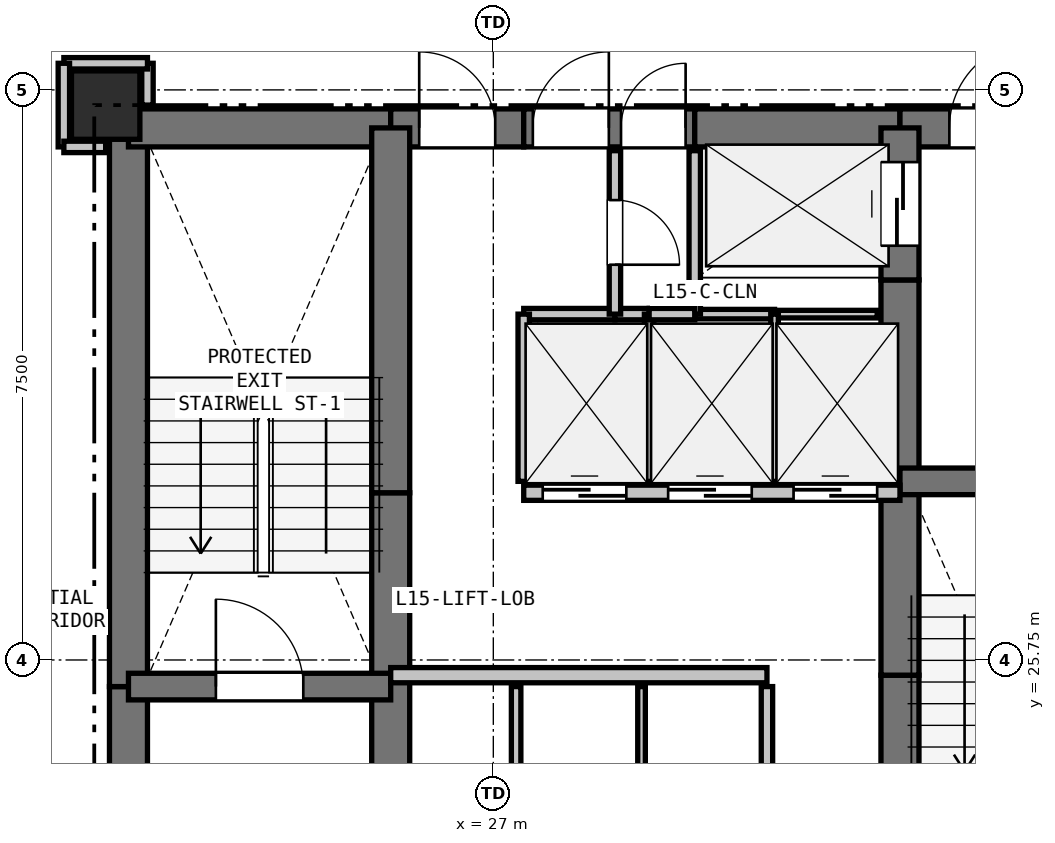
"""IFC4 building model, lengths in metres.
Left out: names, types, materials, properties, quantities, classifications, styles, units other than length and angle.
Written with IfcOpenShell. Run it as: python <this file> out.ifc"""

import sys

from ifc_helpers import new_model, si_unit, direction, frame, frame_2d, origin, origin_2d, place, context, subcontext, project, spatial, rectangle, extrude, element, fill, save


model = new_model("IFC4")
c1 = context("Model", 3, precision=1e-05, world=origin(), true_north=direction((0.0, 1.0)))
c2 = subcontext(c1, "Body", "Model", "MODEL_VIEW")
j1 = project(units=[si_unit("LENGTHUNIT", "METRE"), si_unit("PLANEANGLEUNIT", "RADIAN")], contexts=[c1])
p1 = place(None, origin())
s1 = spatial("IfcSite", under=j1, at=p1, CompositionType="ELEMENT")
p2 = place(p1, origin())
s2 = spatial("IfcBuilding", under=s1, at=p2, CompositionType="ELEMENT")
p3 = place(p2, frame((0.0, 0.0, 55.5)))
s3 = spatial("IfcBuildingStorey", under=s2, at=p3, CompositionType="ELEMENT", Elevation=55.5)
p4 = place(p3, frame((21.9, 33.05, 0.0), z_axis=(0.0, 0.0, 1.0), x_axis=(1.0, 0.0, 0.0)))
e1 = element("IfcColumn", 1, at=p4, inside=s3, PredefinedType="COLUMN", context=c2, shape_type="SweptSolid", body=[
    extrude(rectangle(XDim=0.9, YDim=0.9, at=origin_2d()), origin(), (0.0, 0.0, 1.0), 3.3),
])
p5 = place(p3, frame((22.2, 20.75, 0.0), z_axis=(0.0, 0.0, 1.0), x_axis=(0.0, 1.0, 0.0)))
e2 = element("IfcWall", 2, at=p5, inside=s3, PredefinedType="SHEAR", context=c2, shape_type="SweptSolid", body=[
    extrude(rectangle(XDim=4.65, YDim=0.5, at=frame_2d((2.325, 0.0))), origin(), (0.0, 0.0, 1.0), 3.04),
])
p6 = place(p3, frame((22.2, 25.4, 0.0), z_axis=(0.0, 0.0, 1.0), x_axis=(0.0, 1.0, 0.0)))
e3 = element("IfcWall", 3, at=p6, inside=s3, PredefinedType="SHEAR", context=c2, shape_type="SweptSolid", body=[
    extrude(rectangle(XDim=7.35, YDim=0.5, at=frame_2d((3.675, 0.0))), origin(), (0.0, 0.0, 1.0), 3.04),
])
p7 = place(p3, frame((22.2, 32.75, 0.0), z_axis=(0.0, 0.0, 1.0), x_axis=(1.0, 0.0, 0.0)))
e4 = element("IfcWall", 4, at=p7, inside=s3, PredefinedType="SHEAR", context=c2, shape_type="SweptSolid", body=[
    extrude(rectangle(XDim=3.45, YDim=0.5, at=frame_2d((1.725, 0.0))), origin(), (0.0, 0.0, 1.0), 3.04),
])
p8 = place(p3, frame((25.65, 32.75, 0.0), z_axis=(0.0, 0.0, 1.0), x_axis=(1.0, 0.0, 0.0)))
e5 = element("IfcWall", 5, at=p8, inside=s3, PredefinedType="SHEAR", context=c2, shape_type="SweptSolid", body=[
    extrude(rectangle(XDim=1.75, YDim=0.5, at=frame_2d((0.875, 0.0))), origin(), (0.0, 0.0, 1.0), 3.04),
])
p9 = place(p8, frame((0.375, 0.0, 0.0)))
e6 = element("IfcOpeningElement", 6, at=p9, cuts=e5, PredefinedType="OPENING", context=c2, shape_type="SweptSolid", body=[
    extrude(rectangle(XDim=1.0, YDim=2.15, at=frame_2d((0.5, 1.075))), frame((0.0, 0.26, 0.0), z_axis=(0.0, -1.0, 0.0), x_axis=(1.0, 0.0, 0.0)), (0.0, 0.0, 1.0), 0.52),
])
p10 = place(p3, frame((27.4, 32.75, 0.0), z_axis=(0.0, 0.0, 1.0), x_axis=(1.0, 0.0, 0.0)))
e7 = element("IfcWall", 7, at=p10, inside=s3, PredefinedType="SHEAR", context=c2, shape_type="SweptSolid", body=[
    extrude(rectangle(XDim=2.25, YDim=0.5, at=frame_2d((1.125, 0.0))), origin(), (0.0, 0.0, 1.0), 3.04),
])
p11 = place(p10, frame((0.12, 0.0, 0.0)))
e8 = element("IfcOpeningElement", 8, at=p11, cuts=e7, PredefinedType="OPENING", context=c2, shape_type="SweptSolid", body=[
    extrude(rectangle(XDim=1.0, YDim=2.15, at=frame_2d((0.5, 1.075))), frame((0.0, 0.26, 0.0), z_axis=(0.0, -1.0, 0.0), x_axis=(1.0, 0.0, 0.0)), (0.0, 0.0, 1.0), 0.52),
])
p12 = place(p10, frame((1.28, 0.0, 0.0)))
e9 = element("IfcOpeningElement", 9, at=p12, cuts=e7, PredefinedType="OPENING", context=c2, shape_type="SweptSolid", body=[
    extrude(rectangle(XDim=0.85, YDim=2.1, at=frame_2d((0.425, 1.05))), frame((0.0, 0.26, 0.0), z_axis=(0.0, -1.0, 0.0), x_axis=(1.0, 0.0, 0.0)), (0.0, 0.0, 1.0), 0.52),
])
p13 = place(p3, frame((29.65, 32.75, 0.0), z_axis=(0.0, 0.0, 1.0), x_axis=(1.0, 0.0, 0.0)))
e10 = element("IfcWall", 10, at=p13, inside=s3, PredefinedType="SHEAR", context=c2, shape_type="SweptSolid", body=[
    extrude(rectangle(XDim=2.7, YDim=0.5, at=frame_2d((1.35, 0.0))), origin(), (0.0, 0.0, 1.0), 3.04),
])
p14 = place(p3, frame((32.35, 32.75, 0.0), z_axis=(0.0, 0.0, 1.0), x_axis=(1.0, 0.0, 0.0)))
e11 = element("IfcWall", 11, at=p14, inside=s3, PredefinedType="SHEAR", context=c2, shape_type="SweptSolid", body=[
    extrude(rectangle(XDim=3.45, YDim=0.5, at=frame_2d((1.725, 0.0))), origin(), (0.0, 0.0, 1.0), 3.04),
])
p15 = place(p14, frame((0.65, 0.0, 0.0)))
e12 = element("IfcOpeningElement", 12, at=p15, cuts=e11, PredefinedType="OPENING", context=c2, shape_type="SweptSolid", body=[
    extrude(rectangle(XDim=1.15, YDim=2.15, at=frame_2d((0.575, 1.075))), frame((0.0, 0.26, 0.0), z_axis=(0.0, -1.0, 0.0), x_axis=(1.0, 0.0, 0.0)), (0.0, 0.0, 1.0), 0.52),
])
p16 = place(p3, frame((25.65, 22.75, 0.0), z_axis=(0.0, 0.0, 1.0), x_axis=(0.0, 1.0, 0.0)))
e13 = element("IfcWall", 13, at=p16, inside=s3, PredefinedType="SHEAR", context=c2, shape_type="SweptSolid", body=[
    extrude(rectangle(XDim=2.8, YDim=0.5, at=frame_2d((1.4, 0.0))), origin(), (0.0, 0.0, 1.0), 3.04),
])
p17 = place(p3, frame((25.65, 25.55, 0.0), z_axis=(0.0, 0.0, 1.0), x_axis=(0.0, 1.0, 0.0)))
e14 = element("IfcWall", 14, at=p17, inside=s3, PredefinedType="SHEAR", context=c2, shape_type="SweptSolid", body=[
    extrude(rectangle(XDim=2.4, YDim=0.5, at=frame_2d((1.2, 0.0))), origin(), (0.0, 0.0, 1.0), 3.04),
])
for number, where, z_axis, x_axis in (
    (15, (25.65, 27.95, 0.0), (0.0, 0.0, 1.0), (0.0, 1.0, 0.0)),
    (16, (32.35, 20.75, 0.0), (0.0, 0.0, 1.0), (0.0, 1.0, 0.0)),
):
    element("IfcWall", number, at=place(p3, frame(where, z_axis=z_axis, x_axis=x_axis)), inside=s3, PredefinedType="SHEAR", context=c2, shape_type="SweptSolid", body=[
        extrude(rectangle(XDim=4.8, YDim=0.5, at=frame_2d((2.4, 0.0))), origin(), (0.0, 0.0, 1.0), 3.04),
    ])
p18 = place(p3, frame((32.35, 25.55, 0.0), z_axis=(0.0, 0.0, 1.0), x_axis=(0.0, 1.0, 0.0)))
e17 = element("IfcWall", 17, at=p18, inside=s3, PredefinedType="SHEAR", context=c2, shape_type="SweptSolid", body=[
    extrude(rectangle(XDim=2.4, YDim=0.5, at=frame_2d((1.2, 0.0))), origin(), (0.0, 0.0, 1.0), 3.04),
])
p19 = place(p3, frame((32.35, 27.95, 0.0), z_axis=(0.0, 0.0, 1.0), x_axis=(0.0, 1.0, 0.0)))
e18 = element("IfcWall", 18, at=p19, inside=s3, PredefinedType="SHEAR", context=c2, shape_type="SweptSolid", body=[
    extrude(rectangle(XDim=2.8, YDim=0.5, at=frame_2d((1.4, 0.0))), origin(), (0.0, 0.0, 1.0), 3.04),
])
p20 = place(p3, frame((32.35, 30.75, 0.0), z_axis=(0.0, 0.0, 1.0), x_axis=(0.0, 1.0, 0.0)))
e19 = element("IfcWall", 19, at=p20, inside=s3, PredefinedType="SHEAR", context=c2, shape_type="SweptSolid", body=[
    extrude(rectangle(XDim=2.0, YDim=0.5, at=frame_2d((1.0, 0.0))), origin(), (0.0, 0.0, 1.0), 3.04),
])
p21 = place(p20, frame((0.45, 0.0, 0.0)))
e20 = element("IfcOpeningElement", 20, at=p21, cuts=e19, PredefinedType="OPENING", context=c2, shape_type="SweptSolid", body=[
    extrude(rectangle(XDim=1.1, YDim=2.15, at=frame_2d((0.55, 1.075))), frame((0.0, 0.26, 0.0), z_axis=(0.0, -1.0, 0.0), x_axis=(1.0, 0.0, 0.0)), (0.0, 0.0, 1.0), 0.52),
])
p22 = place(p3, frame((22.2, 25.4, 0.0), z_axis=(0.0, 0.0, 1.0), x_axis=(1.0, 0.0, 0.0)))
e21 = element("IfcWall", 21, at=p22, inside=s3, PredefinedType="SHEAR", context=c2, shape_type="SweptSolid", body=[
    extrude(rectangle(XDim=3.45, YDim=0.35, at=frame_2d((1.725, 0.0))), origin(), (0.0, 0.0, 1.0), 3.04),
])
p23 = place(p22, frame((1.15, 0.0, 0.0)))
e22 = element("IfcOpeningElement", 22, at=p23, cuts=e21, PredefinedType="OPENING", context=c2, shape_type="SweptSolid", body=[
    extrude(rectangle(XDim=1.15, YDim=2.15, at=frame_2d((0.575, 1.075))), frame((0.0, 0.185, 0.0), z_axis=(0.0, -1.0, 0.0), x_axis=(1.0, 0.0, 0.0)), (0.0, 0.0, 1.0), 0.37),
])
p24 = place(p3, frame((32.35, 28.1, 0.0), z_axis=(0.0, 0.0, 1.0), x_axis=(1.0, 0.0, 0.0)))
e23 = element("IfcWall", 23, at=p24, inside=s3, PredefinedType="SHEAR", context=c2, shape_type="SweptSolid", body=[
    extrude(rectangle(XDim=3.45, YDim=0.35, at=frame_2d((1.725, 0.0))), origin(), (0.0, 0.0, 1.0), 3.04),
])
p25 = place(p24, frame((1.15, 0.0, 0.0)))
e24 = element("IfcOpeningElement", 24, at=p25, cuts=e23, PredefinedType="OPENING", context=c2, shape_type="SweptSolid", body=[
    extrude(rectangle(XDim=1.15, YDim=2.15, at=frame_2d((0.575, 1.075))), frame((0.0, 0.185, 0.0), z_axis=(0.0, -1.0, 0.0), x_axis=(1.0, 0.0, 0.0)), (0.0, 0.0, 1.0), 0.37),
])
p26 = place(p3, frame((25.65, 25.55, 0.0), z_axis=(0.0, 0.0, 1.0), x_axis=(1.0, 0.0, 0.0)))
e25 = element("IfcWall", 25, at=p26, inside=s3, PredefinedType="PARTITIONING", context=c2, shape_type="SweptSolid", body=[
    extrude(rectangle(XDim=4.95, YDim=0.2, at=frame_2d((2.475, 0.0))), origin(), (0.0, 0.0, 1.0), 3.04),
])
p27 = place(p3, frame((27.4, 27.95, 0.0), z_axis=(0.0, 0.0, 1.0), x_axis=(1.0, 0.0, 0.0)))
e26 = element("IfcWall", 26, at=p27, inside=s3, PredefinedType="PARTITIONING", context=c2, shape_type="SweptSolid", body=[
    extrude(rectangle(XDim=4.95, YDim=0.2, at=frame_2d((2.475, 0.0))), origin(), (0.0, 0.0, 1.0), 3.04),
])
p28 = place(p27, frame((0.25, 0.0, 0.0)))
e27 = element("IfcOpeningElement", 27, at=p28, cuts=e26, PredefinedType="OPENING", context=c2, shape_type="SweptSolid", body=[
    extrude(rectangle(XDim=1.1, YDim=2.15, at=frame_2d((0.55, 1.075))), frame((0.0, 0.11, 0.0), z_axis=(0.0, -1.0, 0.0), x_axis=(1.0, 0.0, 0.0)), (0.0, 0.0, 1.0), 0.22),
])
p29 = place(p27, frame((1.9, 0.0, 0.0)))
e28 = element("IfcOpeningElement", 28, at=p29, cuts=e26, PredefinedType="OPENING", context=c2, shape_type="SweptSolid", body=[
    extrude(rectangle(XDim=1.1, YDim=2.15, at=frame_2d((0.55, 1.075))), frame((0.0, 0.11, 0.0), z_axis=(0.0, -1.0, 0.0), x_axis=(1.0, 0.0, 0.0)), (0.0, 0.0, 1.0), 0.22),
])
p30 = place(p27, frame((3.55, 0.0, 0.0)))
e29 = element("IfcOpeningElement", 29, at=p30, cuts=e26, PredefinedType="OPENING", context=c2, shape_type="SweptSolid", body=[
    extrude(rectangle(XDim=1.1, YDim=2.15, at=frame_2d((0.55, 1.075))), frame((0.0, 0.11, 0.0), z_axis=(0.0, -1.0, 0.0), x_axis=(1.0, 0.0, 0.0)), (0.0, 0.0, 1.0), 0.22),
])
p31 = place(p3, frame((32.05, 30.3, 0.0), z_axis=(0.0, 0.0, 1.0), x_axis=(-1.0, 0.0, 0.0)))
e30 = element("IfcWall", 30, at=p31, inside=s3, PredefinedType="PARTITIONING", context=c2, shape_type="SweptSolid", body=[
    extrude(rectangle(XDim=1.35, YDim=0.1, at=frame_2d((0.675, 0.0))), origin(), (0.0, 0.0, 1.0), 3.04),
])
p32 = place(p3, frame((30.7, 30.3, 0.0), z_axis=(0.0, 0.0, 1.0), x_axis=(-1.0, 0.0, 0.0)))
e31 = element("IfcWall", 31, at=p32, inside=s3, PredefinedType="PARTITIONING", context=c2, shape_type="SweptSolid", body=[
    extrude(rectangle(XDim=1.05, YDim=0.125, at=frame_2d((0.525, 0.0))), origin(), (0.0, 0.0, 1.0), 3.04),
])
p33 = place(p3, frame((29.65, 30.3, 0.0), z_axis=(0.0, 0.0, 1.0), x_axis=(0.0, 1.0, 0.0)))
e32 = element("IfcWall", 32, at=p33, inside=s3, PredefinedType="PARTITIONING", context=c2, shape_type="SweptSolid", body=[
    extrude(rectangle(XDim=2.15, YDim=0.15, at=frame_2d((1.075, 0.0))), origin(), (0.0, 0.0, 1.0), 3.04),
])
p34 = place(p3, frame((27.3, 25.4, 0.0), z_axis=(0.0, 0.0, 1.0), x_axis=(0.0, -1.0, 0.0)))
e33 = element("IfcWall", 33, at=p34, inside=s3, PredefinedType="PARTITIONING", context=c2, shape_type="SweptSolid", body=[
    extrude(rectangle(XDim=2.2, YDim=0.125, at=frame_2d((1.1, 0.0))), origin(), (0.0, 0.0, 1.0), 3.04),
])
p35 = place(p3, frame((28.95, 25.4, 0.0), z_axis=(0.0, 0.0, 1.0), x_axis=(0.0, -1.0, 0.0)))
e34 = element("IfcWall", 34, at=p35, inside=s3, PredefinedType="PARTITIONING", context=c2, shape_type="SweptSolid", body=[
    extrude(rectangle(XDim=2.2, YDim=0.1, at=frame_2d((1.1, 0.0))), origin(), (0.0, 0.0, 1.0), 3.04),
])
p36 = place(p3, frame((30.6, 25.4, 0.0), z_axis=(0.0, 0.0, 1.0), x_axis=(0.0, -1.0, 0.0)))
e35 = element("IfcWall", 35, at=p36, inside=s3, PredefinedType="PARTITIONING", context=c2, shape_type="SweptSolid", body=[
    extrude(rectangle(XDim=2.2, YDim=0.15, at=frame_2d((1.1, 0.0))), origin(), (0.0, 0.0, 1.0), 3.04),
])
p37 = place(p3, frame((27.4, 30.3, 0.0), z_axis=(0.0, 0.0, 1.0), x_axis=(1.0, 0.0, 0.0)))
e36 = element("IfcWall", 36, at=p37, inside=s3, PredefinedType="PARTITIONING", context=c2, shape_type="SweptSolid", body=[
    extrude(rectangle(XDim=1.2, YDim=0.15, at=frame_2d((0.6, 0.0))), origin(), (0.0, 0.0, 1.0), 3.04),
])
p38 = place(p3, frame((28.6, 30.3, 0.0), z_axis=(0.0, 0.0, 1.0), x_axis=(1.0, 0.0, 0.0)))
e37 = element("IfcWall", 37, at=p38, inside=s3, PredefinedType="PARTITIONING", context=c2, shape_type="SweptSolid", body=[
    extrude(rectangle(XDim=0.45, YDim=0.15, at=frame_2d((0.225, 0.0))), origin(), (0.0, 0.0, 1.0), 3.04),
])
p39 = place(p3, frame((29.05, 30.3, 0.0), z_axis=(0.0, 0.0, 1.0), x_axis=(0.0, -1.0, 0.0)))
e38 = element("IfcWall", 38, at=p39, inside=s3, PredefinedType="PARTITIONING", context=c2, shape_type="SweptSolid", body=[
    extrude(rectangle(XDim=2.2, YDim=0.125, at=frame_2d((1.1, 0.0))), origin(), (0.0, 0.0, 1.0), 3.04),
])
p40 = place(p3, frame((27.4, 28.1, 0.0), z_axis=(0.0, 0.0, 1.0), x_axis=(0.0, 1.0, 0.0)))
e39 = element("IfcWall", 39, at=p40, inside=s3, PredefinedType="PARTITIONING", context=c2, shape_type="SweptSolid", body=[
    extrude(rectangle(XDim=2.2, YDim=0.15, at=frame_2d((1.1, 0.0))), origin(), (0.0, 0.0, 1.0), 3.04),
])
p41 = place(p3, frame((29.05, 30.3, 0.0), z_axis=(0.0, 0.0, 1.0), x_axis=(1.0, 0.0, 0.0)))
e40 = element("IfcWall", 40, at=p41, inside=s3, PredefinedType="PARTITIONING", context=c2, shape_type="SweptSolid", body=[
    extrude(rectangle(XDim=0.6, YDim=0.15, at=frame_2d((0.3, 0.0))), origin(), (0.0, 0.0, 1.0), 3.04),
])
p42 = place(p3, frame((30.7, 30.3, 0.0), z_axis=(0.0, 0.0, 1.0), x_axis=(0.0, -1.0, 0.0)))
e41 = element("IfcWall", 41, at=p42, inside=s3, PredefinedType="PARTITIONING", context=c2, shape_type="SweptSolid", body=[
    extrude(rectangle(XDim=2.2, YDim=0.1, at=frame_2d((1.1, 0.0))), origin(), (0.0, 0.0, 1.0), 3.04),
])
p43 = place(p3, frame((28.6, 32.45, 0.0), z_axis=(0.0, 0.0, 1.0), x_axis=(0.0, -1.0, 0.0)))
e42 = element("IfcWall", 42, at=p43, inside=s3, PredefinedType="PARTITIONING", context=c2, shape_type="SweptSolid", body=[
    extrude(rectangle(XDim=2.15, YDim=0.15, at=frame_2d((1.075, 0.0))), origin(), (0.0, 0.0, 1.0), 3.04),
])
p44 = place(p43, frame((0.65, 0.0, 0.0)))
e43 = element("IfcOpeningElement", 43, at=p44, cuts=e42, PredefinedType="OPENING", context=c2, shape_type="SweptSolid", body=[
    extrude(rectangle(XDim=0.85, YDim=2.1, at=frame_2d((0.425, 1.05))), frame((0.0, 0.085, 0.0), z_axis=(0.0, -1.0, 0.0), x_axis=(1.0, 0.0, 0.0)), (0.0, 0.0, 1.0), 0.17),
])
p45 = place(p3, frame((22.45, 33.05, 0.0), z_axis=(0.0, 0.0, 1.0), x_axis=(0.0, 1.0, 0.0)))
e44 = element("IfcWall", 44, at=p45, inside=s3, PredefinedType="PARTITIONING", context=c2, shape_type="SweptSolid", body=[
    extrude(rectangle(XDim=0.55, YDim=0.15, at=frame_2d((0.275, 0.0))), origin(), (0.0, 0.0, 1.0), 2.488),
])
p46 = place(p3, frame((22.45, 33.6, 0.0), z_axis=(0.0, 0.0, 1.0), x_axis=(-1.0, 0.0, 0.0)))
e45 = element("IfcWall", 45, at=p46, inside=s3, PredefinedType="PARTITIONING", context=c2, shape_type="SweptSolid", body=[
    extrude(rectangle(XDim=1.1, YDim=0.15, at=frame_2d((0.55, 0.0))), origin(), (0.0, 0.0, 1.0), 3.04),
])
p47 = place(p3, frame((21.35, 33.6, 0.0), z_axis=(0.0, 0.0, 1.0), x_axis=(0.0, -1.0, 0.0)))
e46 = element("IfcWall", 46, at=p47, inside=s3, PredefinedType="PARTITIONING", context=c2, shape_type="SweptSolid", body=[
    extrude(rectangle(XDim=1.1, YDim=0.15, at=frame_2d((0.55, 0.0))), origin(), (0.0, 0.0, 1.0), 2.337),
])
p48 = place(p3, frame((21.35, 32.5, 0.0), z_axis=(0.0, 0.0, 1.0), x_axis=(1.0, 0.0, 0.0)))
e47 = element("IfcWall", 47, at=p48, inside=s3, PredefinedType="PARTITIONING", context=c2, shape_type="SweptSolid", body=[
    extrude(rectangle(XDim=0.55, YDim=0.15, at=frame_2d((0.275, 0.0))), origin(), (0.0, 0.0, 1.0), 2.488),
])
p49 = place(p28, origin())
e48 = element("IfcDoor", 48, at=p49, inside=s3, OperationType="SLIDING_TO_LEFT", PredefinedType="DOOR", context=c2, shape_type="SweptSolid", body=[
    extrude(rectangle(XDim=1.1, YDim=2.15, at=frame_2d((0.55, 1.075))), frame((0.0, 0.025, 0.0), z_axis=(0.0, -1.0, 0.0), x_axis=(1.0, 0.0, 0.0)), (0.0, 0.0, 1.0), 0.05),
])
fill(e27, e48)
p50 = place(p29, origin())
e49 = element("IfcDoor", 49, at=p50, inside=s3, OperationType="SLIDING_TO_LEFT", PredefinedType="DOOR", context=c2, shape_type="SweptSolid", body=[
    extrude(rectangle(XDim=1.1, YDim=2.15, at=frame_2d((0.55, 1.075))), frame((0.0, 0.025, 0.0), z_axis=(0.0, -1.0, 0.0), x_axis=(1.0, 0.0, 0.0)), (0.0, 0.0, 1.0), 0.05),
])
fill(e28, e49)
p51 = place(p30, origin())
e50 = element("IfcDoor", 50, at=p51, inside=s3, OperationType="SLIDING_TO_LEFT", PredefinedType="DOOR", context=c2, shape_type="SweptSolid", body=[
    extrude(rectangle(XDim=1.1, YDim=2.15, at=frame_2d((0.55, 1.075))), frame((0.0, 0.025, 0.0), z_axis=(0.0, -1.0, 0.0), x_axis=(1.0, 0.0, 0.0)), (0.0, 0.0, 1.0), 0.05),
])
fill(e29, e50)
p52 = place(p9, origin())
e51 = element("IfcDoor", 51, at=p52, inside=s3, OperationType="SINGLE_SWING_LEFT", PredefinedType="DOOR", context=c2, shape_type="SweptSolid", body=[
    extrude(rectangle(XDim=1.0, YDim=2.15, at=frame_2d((0.5, 1.075))), frame((0.0, 0.025, 0.0), z_axis=(0.0, -1.0, 0.0), x_axis=(1.0, 0.0, 0.0)), (0.0, 0.0, 1.0), 0.05),
])
fill(e6, e51)
p53 = place(p21, origin())
e52 = element("IfcDoor", 52, at=p53, inside=s3, OperationType="SLIDING_TO_LEFT", PredefinedType="DOOR", context=c2, shape_type="SweptSolid", body=[
    extrude(rectangle(XDim=1.1, YDim=2.15, at=frame_2d((0.55, 1.075))), frame((0.0, 0.025, 0.0), z_axis=(0.0, -1.0, 0.0), x_axis=(1.0, 0.0, 0.0)), (0.0, 0.0, 1.0), 0.05),
])
fill(e20, e52)
p54 = place(p23, origin())
e53 = element("IfcDoor", 53, at=p54, inside=s3, OperationType="SINGLE_SWING_LEFT", PredefinedType="DOOR", context=c2, shape_type="SweptSolid", body=[
    extrude(rectangle(XDim=1.15, YDim=2.15, at=frame_2d((0.575, 1.075))), frame((0.0, 0.025, 0.0), z_axis=(0.0, -1.0, 0.0), x_axis=(1.0, 0.0, 0.0)), (0.0, 0.0, 1.0), 0.05),
])
fill(e22, e53)
p55 = place(p15, origin())
e54 = element("IfcDoor", 54, at=p55, inside=s3, OperationType="SINGLE_SWING_RIGHT", PredefinedType="DOOR", context=c2, shape_type="SweptSolid", body=[
    extrude(rectangle(XDim=1.15, YDim=2.15, at=frame_2d((0.575, 1.075))), frame((0.0, 0.025, 0.0), z_axis=(0.0, -1.0, 0.0), x_axis=(1.0, 0.0, 0.0)), (0.0, 0.0, 1.0), 0.05),
])
fill(e12, e54)
p56 = place(p11, origin())
e55 = element("IfcDoor", 55, at=p56, inside=s3, OperationType="SINGLE_SWING_RIGHT", PredefinedType="DOOR", context=c2, shape_type="SweptSolid", body=[
    extrude(rectangle(XDim=1.0, YDim=2.15, at=frame_2d((0.5, 1.075))), frame((0.0, 0.025, 0.0), z_axis=(0.0, -1.0, 0.0), x_axis=(1.0, 0.0, 0.0)), (0.0, 0.0, 1.0), 0.05),
])
fill(e8, e55)
p57 = place(p44, origin())
e56 = element("IfcDoor", 56, at=p57, inside=s3, OperationType="SINGLE_SWING_RIGHT", PredefinedType="DOOR", context=c2, shape_type="SweptSolid", body=[
    extrude(rectangle(XDim=0.85, YDim=2.1, at=frame_2d((0.425, 1.05))), frame((0.0, 0.025, 0.0), z_axis=(0.0, -1.0, 0.0), x_axis=(1.0, 0.0, 0.0)), (0.0, 0.0, 1.0), 0.05),
])
fill(e43, e56)
p58 = place(p12, origin())
e57 = element("IfcDoor", 57, at=p58, inside=s3, OperationType="SINGLE_SWING_RIGHT", PredefinedType="DOOR", context=c2, shape_type="SweptSolid", body=[
    extrude(rectangle(XDim=0.85, YDim=2.1, at=frame_2d((0.425, 1.05))), frame((0.0, 0.025, 0.0), z_axis=(0.0, -1.0, 0.0), x_axis=(1.0, 0.0, 0.0)), (0.0, 0.0, 1.0), 0.05),
])
fill(e9, e57)
save(model, sys.argv[1])
